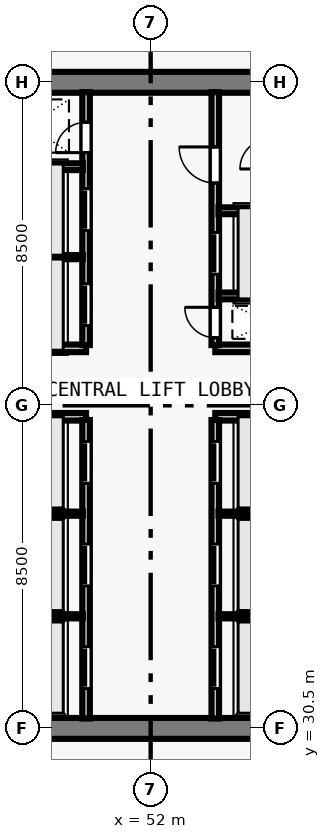
"""IFC4 building model, lengths in metres.
Left out: names, types, materials, properties, quantities, classifications, styles, units other than length and angle.
Written with IfcOpenShell. Run it as: python <this file> out.ifc"""

import sys

from ifc_helpers import new_model, si_unit, direction, frame, frame_2d, origin, place, context, subcontext, project, spatial, rectangle, extrude, element, fill, save


model = new_model("IFC4")
c1 = context("Model", 3, precision=1e-05, world=origin(), true_north=direction((0.0, 1.0)))
c2 = subcontext(c1, "Body", "Model", "MODEL_VIEW")
j1 = project(units=[si_unit("LENGTHUNIT", "METRE"), si_unit("PLANEANGLEUNIT", "RADIAN")], contexts=[c1])
p1 = place(None, origin())
s1 = spatial("IfcSite", under=j1, at=p1, CompositionType="ELEMENT")
p2 = place(p1, origin())
s2 = spatial("IfcBuilding", under=s1, at=p2, CompositionType="ELEMENT")
p3 = place(p2, origin())
s3 = spatial("IfcBuildingStorey", under=s2, at=p3, CompositionType="ELEMENT", Elevation=0.0)
for number, where, z_axis, x_axis in (
    (1, (43.225, 30.5, 0.0), (0.0, 0.0, 1.0), (1.0, 0.0, 0.0)),
    (2, (43.225, 47.5, 0.0), (0.0, 0.0, 1.0), (1.0, 0.0, 0.0)),
):
    element("IfcWall", number, at=place(p3, frame(where, z_axis=z_axis, x_axis=x_axis)), inside=s3, PredefinedType="SHEAR", context=c2, shape_type="SweptSolid", body=[
        extrude(rectangle(XDim=17.55, YDim=0.55, at=frame_2d((8.775, 0.0))), origin(), (0.0, 0.0, 1.0), 4.7),
    ])
for number, where, z_axis, x_axis in (
    (3, (47.35, 38.7, 0.0), (0.0, 0.0, 1.0), (1.0, 0.0, 0.0)),
    (4, (47.35, 40.5, 0.0), (0.0, 0.0, 1.0), (1.0, 0.0, 0.0)),
    (5, (53.7, 38.7, 0.0), (0.0, 0.0, 1.0), (1.0, 0.0, 0.0)),
    (6, (53.7, 40.5, 0.0), (0.0, 0.0, 1.0), (1.0, 0.0, 0.0)),
):
    element("IfcWall", number, at=place(p3, frame(where, z_axis=z_axis, x_axis=x_axis)), inside=s3, PredefinedType="SOLIDWALL", context=c2, shape_type="SweptSolid", body=[
        extrude(rectangle(XDim=2.95, YDim=0.2, at=frame_2d((1.475, 0.0))), origin(), (0.0, 0.0, 1.0), 4.7),
    ])
p4 = place(p3, frame((50.3, 30.76, 0.0), z_axis=(0.0, 0.0, 1.0), x_axis=(0.0, 1.0, 0.0)))
e7 = element("IfcWall", 7, at=p4, inside=s3, PredefinedType="SOLIDWALL", context=c2, shape_type="SweptSolid", body=[
    extrude(rectangle(XDim=7.855, YDim=0.2, at=frame_2d((3.927, 0.0))), origin(), (0.0, 0.0, 1.0), 4.7),
])
p5 = place(p4, frame((0.79, 0.0, 0.0)))
e8 = element("IfcOpeningElement", 8, at=p5, cuts=e7, PredefinedType="OPENING", context=c2, shape_type="SweptSolid", body=[
    extrude(rectangle(XDim=1.1, YDim=2.2, at=frame_2d((0.55, 1.1))), frame((0.0, 0.11, 0.0), z_axis=(0.0, -1.0, 0.0), x_axis=(1.0, 0.0, 0.0)), (0.0, 0.0, 1.0), 0.22),
])
p6 = place(p4, frame((3.49, 0.0, 0.0)))
e9 = element("IfcOpeningElement", 9, at=p6, cuts=e7, PredefinedType="OPENING", context=c2, shape_type="SweptSolid", body=[
    extrude(rectangle(XDim=1.1, YDim=2.2, at=frame_2d((0.55, 1.1))), frame((0.0, 0.11, 0.0), z_axis=(0.0, -1.0, 0.0), x_axis=(1.0, 0.0, 0.0)), (0.0, 0.0, 1.0), 0.22),
])
p7 = place(p4, frame((6.19, 0.0, 0.0)))
e10 = element("IfcOpeningElement", 10, at=p7, cuts=e7, PredefinedType="OPENING", context=c2, shape_type="SweptSolid", body=[
    extrude(rectangle(XDim=1.1, YDim=2.2, at=frame_2d((0.55, 1.1))), frame((0.0, 0.11, 0.0), z_axis=(0.0, -1.0, 0.0), x_axis=(1.0, 0.0, 0.0)), (0.0, 0.0, 1.0), 0.22),
])
p8 = place(p3, frame((53.7, 30.76, 0.0), z_axis=(0.0, 0.0, 1.0), x_axis=(0.0, 1.0, 0.0)))
e11 = element("IfcWall", 11, at=p8, inside=s3, PredefinedType="SOLIDWALL", context=c2, shape_type="SweptSolid", body=[
    extrude(rectangle(XDim=7.855, YDim=0.2, at=frame_2d((3.927, 0.0))), origin(), (0.0, 0.0, 1.0), 4.7),
])
p9 = place(p8, frame((0.79, 0.0, 0.0)))
e12 = element("IfcOpeningElement", 12, at=p9, cuts=e11, PredefinedType="OPENING", context=c2, shape_type="SweptSolid", body=[
    extrude(rectangle(XDim=1.1, YDim=2.2, at=frame_2d((0.55, 1.1))), frame((0.0, 0.11, 0.0), z_axis=(0.0, -1.0, 0.0), x_axis=(1.0, 0.0, 0.0)), (0.0, 0.0, 1.0), 0.22),
])
p10 = place(p8, frame((3.49, 0.0, 0.0)))
e13 = element("IfcOpeningElement", 13, at=p10, cuts=e11, PredefinedType="OPENING", context=c2, shape_type="SweptSolid", body=[
    extrude(rectangle(XDim=1.1, YDim=2.2, at=frame_2d((0.55, 1.1))), frame((0.0, 0.11, 0.0), z_axis=(0.0, -1.0, 0.0), x_axis=(1.0, 0.0, 0.0)), (0.0, 0.0, 1.0), 0.22),
])
p11 = place(p8, frame((6.19, 0.0, 0.0)))
e14 = element("IfcOpeningElement", 14, at=p11, cuts=e11, PredefinedType="OPENING", context=c2, shape_type="SweptSolid", body=[
    extrude(rectangle(XDim=1.1, YDim=2.2, at=frame_2d((0.55, 1.1))), frame((0.0, 0.11, 0.0), z_axis=(0.0, -1.0, 0.0), x_axis=(1.0, 0.0, 0.0)), (0.0, 0.0, 1.0), 0.22),
])
p12 = place(p3, frame((50.3, 40.585, 0.0), z_axis=(0.0, 0.0, 1.0), x_axis=(0.0, 1.0, 0.0)))
e15 = element("IfcWall", 15, at=p12, inside=s3, PredefinedType="SOLIDWALL", context=c2, shape_type="SweptSolid", body=[
    extrude(rectangle(XDim=6.655, YDim=0.2, at=frame_2d((3.328, 0.0))), origin(), (0.0, 0.0, 1.0), 4.7),
])
p13 = place(p12, frame((0.515, 0.0, 0.0)))
e16 = element("IfcOpeningElement", 16, at=p13, cuts=e15, PredefinedType="OPENING", context=c2, shape_type="SweptSolid", body=[
    extrude(rectangle(XDim=1.1, YDim=2.2, at=frame_2d((0.55, 1.1))), frame((0.0, 0.11, 0.0), z_axis=(0.0, -1.0, 0.0), x_axis=(1.0, 0.0, 0.0)), (0.0, 0.0, 1.0), 0.22),
])
p14 = place(p12, frame((3.015, 0.0, 0.0)))
e17 = element("IfcOpeningElement", 17, at=p14, cuts=e15, PredefinedType="OPENING", context=c2, shape_type="SweptSolid", body=[
    extrude(rectangle(XDim=1.1, YDim=2.2, at=frame_2d((0.55, 1.1))), frame((0.0, 0.11, 0.0), z_axis=(0.0, -1.0, 0.0), x_axis=(1.0, 0.0, 0.0)), (0.0, 0.0, 1.0), 0.22),
])
p15 = place(p12, frame((5.065, 0.0, 0.0)))
e18 = element("IfcOpeningElement", 18, at=p15, cuts=e15, PredefinedType="OPENING", context=c2, shape_type="SweptSolid", body=[
    extrude(rectangle(XDim=0.8, YDim=2.08, at=frame_2d((0.4, 1.04))), frame((0.0, 0.11, 0.0), z_axis=(0.0, -1.0, 0.0), x_axis=(1.0, 0.0, 0.0)), (0.0, 0.0, 1.0), 0.22),
])
p16 = place(p3, frame((53.7, 40.585, 0.0), z_axis=(0.0, 0.0, 1.0), x_axis=(0.0, 1.0, 0.0)))
e19 = element("IfcWall", 19, at=p16, inside=s3, PredefinedType="SOLIDWALL", context=c2, shape_type="SweptSolid", body=[
    extrude(rectangle(XDim=6.655, YDim=0.2, at=frame_2d((3.328, 0.0))), origin(), (0.0, 0.0, 1.0), 4.7),
])
p17 = place(p16, frame((0.195, 0.0, 0.0)))
e20 = element("IfcOpeningElement", 20, at=p17, cuts=e19, PredefinedType="OPENING", context=c2, shape_type="SweptSolid", body=[
    extrude(rectangle(XDim=0.8, YDim=2.08, at=frame_2d((0.4, 1.04))), frame((0.0, 0.11, 0.0), z_axis=(0.0, -1.0, 0.0), x_axis=(1.0, 0.0, 0.0)), (0.0, 0.0, 1.0), 0.22),
])
p18 = place(p16, frame((1.865, 0.0, 0.0)))
e21 = element("IfcOpeningElement", 21, at=p18, cuts=e19, PredefinedType="OPENING", context=c2, shape_type="SweptSolid", body=[
    extrude(rectangle(XDim=1.1, YDim=2.2, at=frame_2d((0.55, 1.1))), frame((0.0, 0.11, 0.0), z_axis=(0.0, -1.0, 0.0), x_axis=(1.0, 0.0, 0.0)), (0.0, 0.0, 1.0), 0.22),
])
p19 = place(p16, frame((4.265, 0.0, 0.0)))
e22 = element("IfcOpeningElement", 22, at=p19, cuts=e19, PredefinedType="OPENING", context=c2, shape_type="SweptSolid", body=[
    extrude(rectangle(XDim=0.95, YDim=2.12, at=frame_2d((0.475, 1.06))), frame((0.0, 0.11, 0.0), z_axis=(0.0, -1.0, 0.0), x_axis=(1.0, 0.0, 0.0)), (0.0, 0.0, 1.0), 0.22),
])
for number, where, z_axis, x_axis in (
    (23, (47.425, 33.45, 0.0), (0.0, 0.0, 1.0), (1.0, 0.0, 0.0)),
    (24, (47.425, 36.15, 0.0), (0.0, 0.0, 1.0), (1.0, 0.0, 0.0)),
    (25, (53.785, 33.45, 0.0), (0.0, 0.0, 1.0), (1.0, 0.0, 0.0)),
    (26, (53.785, 36.15, 0.0), (0.0, 0.0, 1.0), (1.0, 0.0, 0.0)),
):
    element("IfcWall", number, at=place(p3, frame(where, z_axis=z_axis, x_axis=x_axis)), inside=s3, PredefinedType="PARTITIONING", context=c2, shape_type="SweptSolid", body=[
        extrude(rectangle(XDim=2.79, YDim=0.11, at=frame_2d((1.395, 0.0))), origin(), (0.0, 0.0, 1.0), 4.7),
    ])
p20 = place(p3, frame((47.435, 42.9, 0.0), z_axis=(0.0, 0.0, 1.0), x_axis=(1.0, 0.0, 0.0)))
e27 = element("IfcWall", 27, at=p20, inside=s3, PredefinedType="PARTITIONING", context=c2, shape_type="SweptSolid", body=[
    extrude(rectangle(XDim=2.78, YDim=0.11, at=frame_2d((1.39, 0.0))), origin(), (0.0, 0.0, 1.0), 4.7),
])
p21 = place(p3, frame((47.425, 45.28, 0.0), z_axis=(0.0, 0.0, 1.0), x_axis=(1.0, 0.0, 0.0)))
e28 = element("IfcWall", 28, at=p21, inside=s3, PredefinedType="SOLIDWALL", context=c2, shape_type="SweptSolid", body=[
    extrude(rectangle(XDim=2.79, YDim=0.18, at=frame_2d((1.395, 0.0))), origin(), (0.0, 0.0, 1.0), 4.7),
])
p22 = place(p3, frame((53.785, 41.88, 0.0), z_axis=(0.0, 0.0, 1.0), x_axis=(1.0, 0.0, 0.0)))
e29 = element("IfcWall", 29, at=p22, inside=s3, PredefinedType="SOLIDWALL", context=c2, shape_type="SweptSolid", body=[
    extrude(rectangle(XDim=2.78, YDim=0.18, at=frame_2d((1.39, 0.0))), origin(), (0.0, 0.0, 1.0), 4.7),
])
p23 = place(p3, frame((53.785, 44.12, 0.0), z_axis=(0.0, 0.0, 1.0), x_axis=(1.0, 0.0, 0.0)))
e30 = element("IfcWall", 30, at=p23, inside=s3, PredefinedType="SOLIDWALL", context=c2, shape_type="SweptSolid", body=[
    extrude(rectangle(XDim=2.79, YDim=0.18, at=frame_2d((1.395, 0.0))), origin(), (0.0, 0.0, 1.0), 4.7),
])
p24 = place(p5, origin())
e31 = element("IfcDoor", 31, at=p24, inside=s3, OperationType="SLIDING_TO_LEFT", PredefinedType="DOOR", context=c2, shape_type="SweptSolid", body=[
    extrude(rectangle(XDim=1.1, YDim=2.2, at=frame_2d((0.55, 1.1))), frame((0.0, 0.025, 0.0), z_axis=(0.0, -1.0, 0.0), x_axis=(1.0, 0.0, 0.0)), (0.0, 0.0, 1.0), 0.05),
])
fill(e8, e31)
p25 = place(p6, origin())
e32 = element("IfcDoor", 32, at=p25, inside=s3, OperationType="SLIDING_TO_LEFT", PredefinedType="DOOR", context=c2, shape_type="SweptSolid", body=[
    extrude(rectangle(XDim=1.1, YDim=2.2, at=frame_2d((0.55, 1.1))), frame((0.0, 0.025, 0.0), z_axis=(0.0, -1.0, 0.0), x_axis=(1.0, 0.0, 0.0)), (0.0, 0.0, 1.0), 0.05),
])
fill(e9, e32)
p26 = place(p7, origin())
e33 = element("IfcDoor", 33, at=p26, inside=s3, OperationType="SLIDING_TO_LEFT", PredefinedType="DOOR", context=c2, shape_type="SweptSolid", body=[
    extrude(rectangle(XDim=1.1, YDim=2.2, at=frame_2d((0.55, 1.1))), frame((0.0, 0.025, 0.0), z_axis=(0.0, -1.0, 0.0), x_axis=(1.0, 0.0, 0.0)), (0.0, 0.0, 1.0), 0.05),
])
fill(e10, e33)
p27 = place(p9, origin())
e34 = element("IfcDoor", 34, at=p27, inside=s3, OperationType="SLIDING_TO_LEFT", PredefinedType="DOOR", context=c2, shape_type="SweptSolid", body=[
    extrude(rectangle(XDim=1.1, YDim=2.2, at=frame_2d((0.55, 1.1))), frame((0.0, 0.025, 0.0), z_axis=(0.0, -1.0, 0.0), x_axis=(1.0, 0.0, 0.0)), (0.0, 0.0, 1.0), 0.05),
])
fill(e12, e34)
p28 = place(p10, origin())
e35 = element("IfcDoor", 35, at=p28, inside=s3, OperationType="SLIDING_TO_LEFT", PredefinedType="DOOR", context=c2, shape_type="SweptSolid", body=[
    extrude(rectangle(XDim=1.1, YDim=2.2, at=frame_2d((0.55, 1.1))), frame((0.0, 0.025, 0.0), z_axis=(0.0, -1.0, 0.0), x_axis=(1.0, 0.0, 0.0)), (0.0, 0.0, 1.0), 0.05),
])
fill(e13, e35)
p29 = place(p11, origin())
e36 = element("IfcDoor", 36, at=p29, inside=s3, OperationType="SLIDING_TO_LEFT", PredefinedType="DOOR", context=c2, shape_type="SweptSolid", body=[
    extrude(rectangle(XDim=1.1, YDim=2.2, at=frame_2d((0.55, 1.1))), frame((0.0, 0.025, 0.0), z_axis=(0.0, -1.0, 0.0), x_axis=(1.0, 0.0, 0.0)), (0.0, 0.0, 1.0), 0.05),
])
fill(e14, e36)
p30 = place(p13, origin())
e37 = element("IfcDoor", 37, at=p30, inside=s3, OperationType="SLIDING_TO_LEFT", PredefinedType="DOOR", context=c2, shape_type="SweptSolid", body=[
    extrude(rectangle(XDim=1.1, YDim=2.2, at=frame_2d((0.55, 1.1))), frame((0.0, 0.025, 0.0), z_axis=(0.0, -1.0, 0.0), x_axis=(1.0, 0.0, 0.0)), (0.0, 0.0, 1.0), 0.05),
])
fill(e16, e37)
p31 = place(p14, origin())
e38 = element("IfcDoor", 38, at=p31, inside=s3, OperationType="SLIDING_TO_LEFT", PredefinedType="DOOR", context=c2, shape_type="SweptSolid", body=[
    extrude(rectangle(XDim=1.1, YDim=2.2, at=frame_2d((0.55, 1.1))), frame((0.0, 0.025, 0.0), z_axis=(0.0, -1.0, 0.0), x_axis=(1.0, 0.0, 0.0)), (0.0, 0.0, 1.0), 0.05),
])
fill(e17, e38)
p32 = place(p15, origin())
e39 = element("IfcDoor", 39, at=p32, inside=s3, OperationType="SINGLE_SWING_LEFT", PredefinedType="DOOR", context=c2, shape_type="SweptSolid", body=[
    extrude(rectangle(XDim=0.8, YDim=2.08, at=frame_2d((0.4, 1.04))), frame((0.0, 0.025, 0.0), z_axis=(0.0, -1.0, 0.0), x_axis=(1.0, 0.0, 0.0)), (0.0, 0.0, 1.0), 0.05),
])
fill(e18, e39)
p33 = place(p17, origin())
e40 = element("IfcDoor", 40, at=p33, inside=s3, OperationType="SINGLE_SWING_RIGHT", PredefinedType="DOOR", context=c2, shape_type="SweptSolid", body=[
    extrude(rectangle(XDim=0.8, YDim=2.08, at=frame_2d((0.4, 1.04))), frame((0.0, 0.025, 0.0), z_axis=(0.0, -1.0, 0.0), x_axis=(1.0, 0.0, 0.0)), (0.0, 0.0, 1.0), 0.05),
])
fill(e20, e40)
p34 = place(p18, origin())
e41 = element("IfcDoor", 41, at=p34, inside=s3, OperationType="SLIDING_TO_LEFT", PredefinedType="DOOR", context=c2, shape_type="SweptSolid", body=[
    extrude(rectangle(XDim=1.1, YDim=2.2, at=frame_2d((0.55, 1.1))), frame((0.0, 0.025, 0.0), z_axis=(0.0, -1.0, 0.0), x_axis=(1.0, 0.0, 0.0)), (0.0, 0.0, 1.0), 0.05),
])
fill(e21, e41)
p35 = place(p19, origin())
e42 = element("IfcDoor", 42, at=p35, inside=s3, OperationType="SINGLE_SWING_RIGHT", PredefinedType="DOOR", context=c2, shape_type="SweptSolid", body=[
    extrude(rectangle(XDim=0.95, YDim=2.12, at=frame_2d((0.475, 1.06))), frame((0.0, 0.025, 0.0), z_axis=(0.0, -1.0, 0.0), x_axis=(1.0, 0.0, 0.0)), (0.0, 0.0, 1.0), 0.05),
])
fill(e22, e42)
save(model, sys.argv[1])
